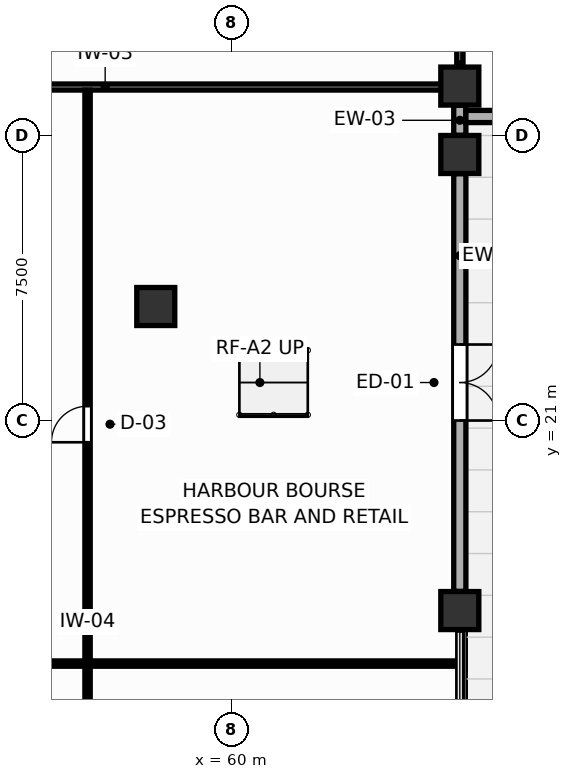
"""IFC4 building model, lengths in metres.
Left out: names, types, materials, properties, quantities, classifications, styles, units other than length and angle.
Written with IfcOpenShell. Run it as: python <this file> out.ifc"""

import sys

from ifc_helpers import new_model, si_unit, direction, frame, frame_2d, origin, origin_2d, place, context, subcontext, project, spatial, rectangle, extrude, source, transform, mapped, element, fill, save


model = new_model("IFC4")
c1 = context("Model", 3, precision=1e-05, world=origin(), true_north=direction((0.0, 1.0)))
c2 = subcontext(c1, "Body", "Model", "MODEL_VIEW")
j1 = project(units=[si_unit("LENGTHUNIT", "METRE"), si_unit("PLANEANGLEUNIT", "RADIAN")], contexts=[c1])
p1 = place(None, origin())
s1 = spatial("IfcSite", under=j1, at=p1, CompositionType="ELEMENT")
p2 = place(p1, origin())
s2 = spatial("IfcBuilding", under=s1, at=p2, CompositionType="ELEMENT")
p3 = place(p2, origin())
s3 = spatial("IfcBuildingStorey", under=s2, at=p3, CompositionType="ELEMENT", Elevation=0.0)
m1 = source(origin(), c2, "Body", "SweptSolid", [
    extrude(rectangle(XDim=1.0, YDim=1.0, at=origin_2d()), origin(), (0.0, 0.0, 1.0), 4.8),
])
for number, where, z_axis, x_axis in (
    (1, (66.0, 16.0, 0.0), (0.0, 0.0, 1.0), (1.0, 0.0, 0.0)),
    (2, (66.0, 28.0, 0.0), (0.0, 0.0, 1.0), (1.0, 0.0, 0.0)),
    (3, (58.0, 24.0, 0.0), (0.0, 0.0, 1.0), (1.0, 0.0, 0.0)),
    (4, (66.0, 29.8, 0.0), (0.0, 0.0, 1.0), (1.0, 0.0, 0.0)),
):
    element("IfcColumn", number, at=place(p3, frame(where, z_axis=z_axis, x_axis=x_axis)), inside=s3, PredefinedType="COLUMN", context=c2, shape_type="MappedRepresentation", body=[
        mapped(m1, transform((0.0, 0.0, 0.0), scale=1.0)),
    ])
p4 = place(p3, frame((66.0, 16.505, 0.0), z_axis=(0.0, 0.0, 1.0), x_axis=(0.0, 1.0, 0.0)))
e5 = element("IfcWall", 5, at=p4, inside=s3, PredefinedType="SOLIDWALL", context=c2, shape_type="SweptSolid", body=[
    extrude(rectangle(XDim=10.99, YDim=0.32, at=frame_2d((5.495, 0.0))), origin(), (0.0, 0.0, 1.0), 3.82),
])
p5 = place(p4, frame((4.495, 0.0, 0.0)))
e6 = element("IfcOpeningElement", 6, at=p5, cuts=e5, PredefinedType="OPENING", context=c2, shape_type="SweptSolid", body=[
    extrude(rectangle(XDim=2.0, YDim=2.25, at=frame_2d((1.0, 1.125))), frame((0.0, 0.17, 0.0), z_axis=(0.0, -1.0, 0.0), x_axis=(1.0, 0.0, 0.0)), (0.0, 0.0, 1.0), 0.34),
])
p6 = place(p3, frame((66.0, 28.505, 0.0), z_axis=(0.0, 0.0, 1.0), x_axis=(0.0, 1.0, 0.0)))
e7 = element("IfcWall", 7, at=p6, inside=s3, PredefinedType="SOLIDWALL", context=c2, shape_type="SweptSolid", body=[
    extrude(rectangle(XDim=0.79, YDim=0.32, at=frame_2d((0.395, 0.0))), origin(), (0.0, 0.0, 1.0), 3.82),
])
p7 = place(p3, frame((66.16, 29.0, 0.0), z_axis=(0.0, 0.0, 1.0), x_axis=(1.0, 0.0, 0.0)))
e8 = element("IfcWall", 8, at=p7, inside=s3, PredefinedType="SOLIDWALL", context=c2, shape_type="SweptSolid", body=[
    extrude(rectangle(XDim=25.06, YDim=0.32, at=frame_2d((12.53, 0.0))), origin(), (0.0, 0.0, 1.0), 4.54),
])
p8 = place(p7, frame((11.53, 0.0, 0.0)))
e9 = element("IfcOpeningElement", 9, at=p8, cuts=e8, PredefinedType="OPENING", context=c2, shape_type="SweptSolid", body=[
    extrude(rectangle(XDim=2.0, YDim=2.25, at=frame_2d((1.0, 1.125))), frame((0.0, 0.17, 0.0), z_axis=(0.0, -1.0, 0.0), x_axis=(1.0, 0.0, 0.0)), (0.0, 0.0, 1.0), 0.34),
])
p9 = place(p3, frame((66.0, 30.4, 0.0), z_axis=(0.0, 0.0, 1.0), x_axis=(0.0, 1.0, 0.0)))
e10 = element("IfcWall", 10, at=p9, inside=s3, PredefinedType="PARTITIONING", context=c2, shape_type="SweptSolid", body=[
    extrude(rectangle(XDim=11.2, YDim=0.16, at=frame_2d((5.6, 0.0))), origin(), (0.0, 0.0, 1.0), 3.82),
])
p10 = place(p9, frame((0.45, 0.0, 0.0)))
e11 = element("IfcOpeningElement", 11, at=p10, cuts=e10, PredefinedType="OPENING", context=c2, shape_type="SweptSolid", body=[
    extrude(rectangle(XDim=1.3, YDim=2.1, at=frame_2d((0.65, 1.05))), frame((0.0, 0.09, 0.0), z_axis=(0.0, -1.0, 0.0), x_axis=(1.0, 0.0, 0.0)), (0.0, 0.0, 1.0), 0.18),
])
p11 = place(p3, frame((47.357, 29.775, 0.0), z_axis=(0.0, 0.0, 1.0), x_axis=(1.0, 0.0, 0.0)))
e12 = element("IfcWall", 12, at=p11, inside=s3, PredefinedType="PARTITIONING", context=c2, shape_type="SweptSolid", body=[
    extrude(rectangle(XDim=18.623, YDim=0.16, at=frame_2d((9.312, 0.0))), origin(), (0.0, 0.0, 1.0), 4.52),
])
p12 = place(p3, frame((56.205, 3.02, 0.0), z_axis=(0.0, 0.0, 1.0), x_axis=(0.0, 1.0, 0.0)))
e13 = element("IfcWall", 13, at=p12, inside=s3, PredefinedType="PARTITIONING", context=c2, shape_type="SweptSolid", body=[
    extrude(rectangle(XDim=26.673, YDim=0.14, at=frame_2d((13.336, 0.0))), origin(), (0.0, 0.0, 1.0), 4.52),
])
p13 = place(p12, frame((5.263, 0.0, 0.0)))
e14 = element("IfcOpeningElement", 14, at=p13, cuts=e13, PredefinedType="OPENING", context=c2, shape_type="SweptSolid", body=[
    extrude(rectangle(XDim=0.95, YDim=2.05, at=frame_2d((0.475, 1.025))), frame((0.0, 0.08, 0.0), z_axis=(0.0, -1.0, 0.0), x_axis=(1.0, 0.0, 0.0)), (0.0, 0.0, 1.0), 0.16),
])
p14 = place(p12, frame((17.408, 0.0, 0.0)))
e15 = element("IfcOpeningElement", 15, at=p14, cuts=e13, PredefinedType="OPENING", context=c2, shape_type="SweptSolid", body=[
    extrude(rectangle(XDim=0.95, YDim=2.05, at=frame_2d((0.475, 1.025))), frame((0.0, 0.08, 0.0), z_axis=(0.0, -1.0, 0.0), x_axis=(1.0, 0.0, 0.0)), (0.0, 0.0, 1.0), 0.16),
])
p15 = place(p3, frame((47.357, 14.605, 0.0), z_axis=(0.0, 0.0, 1.0), x_axis=(1.0, 0.0, 0.0)))
e16 = element("IfcWall", 16, at=p15, inside=s3, PredefinedType="PARTITIONING", context=c2, shape_type="SweptSolid", body=[
    extrude(rectangle(XDim=18.623, YDim=0.14, at=frame_2d((9.312, 0.0))), origin(), (0.0, 0.0, 1.0), 4.52),
])
p16 = place(p5, frame((2.0, 0.0, 0.0), z_axis=(0.0, 0.0, 1.0), x_axis=(-1.0, 0.0, 0.0)))
e17 = element("IfcDoor", 17, at=p16, inside=s3, OperationType="DOUBLE_DOOR_SINGLE_SWING", PredefinedType="DOOR", context=c2, shape_type="SweptSolid", body=[
    extrude(rectangle(XDim=2.0, YDim=2.25, at=frame_2d((1.0, 1.125))), frame((0.0, 0.025, 0.0), z_axis=(0.0, -1.0, 0.0), x_axis=(1.0, 0.0, 0.0)), (0.0, 0.0, 1.0), 0.05),
])
fill(e6, e17)
p17 = place(p14, origin())
e18 = element("IfcDoor", 18, at=p17, inside=s3, OperationType="SINGLE_SWING_LEFT", PredefinedType="DOOR", context=c2, shape_type="SweptSolid", body=[
    extrude(rectangle(XDim=0.95, YDim=2.05, at=frame_2d((0.475, 1.025))), frame((0.0, 0.025, 0.0), z_axis=(0.0, -1.0, 0.0), x_axis=(1.0, 0.0, 0.0)), (0.0, 0.0, 1.0), 0.05),
])
fill(e15, e18)
save(model, sys.argv[1])
